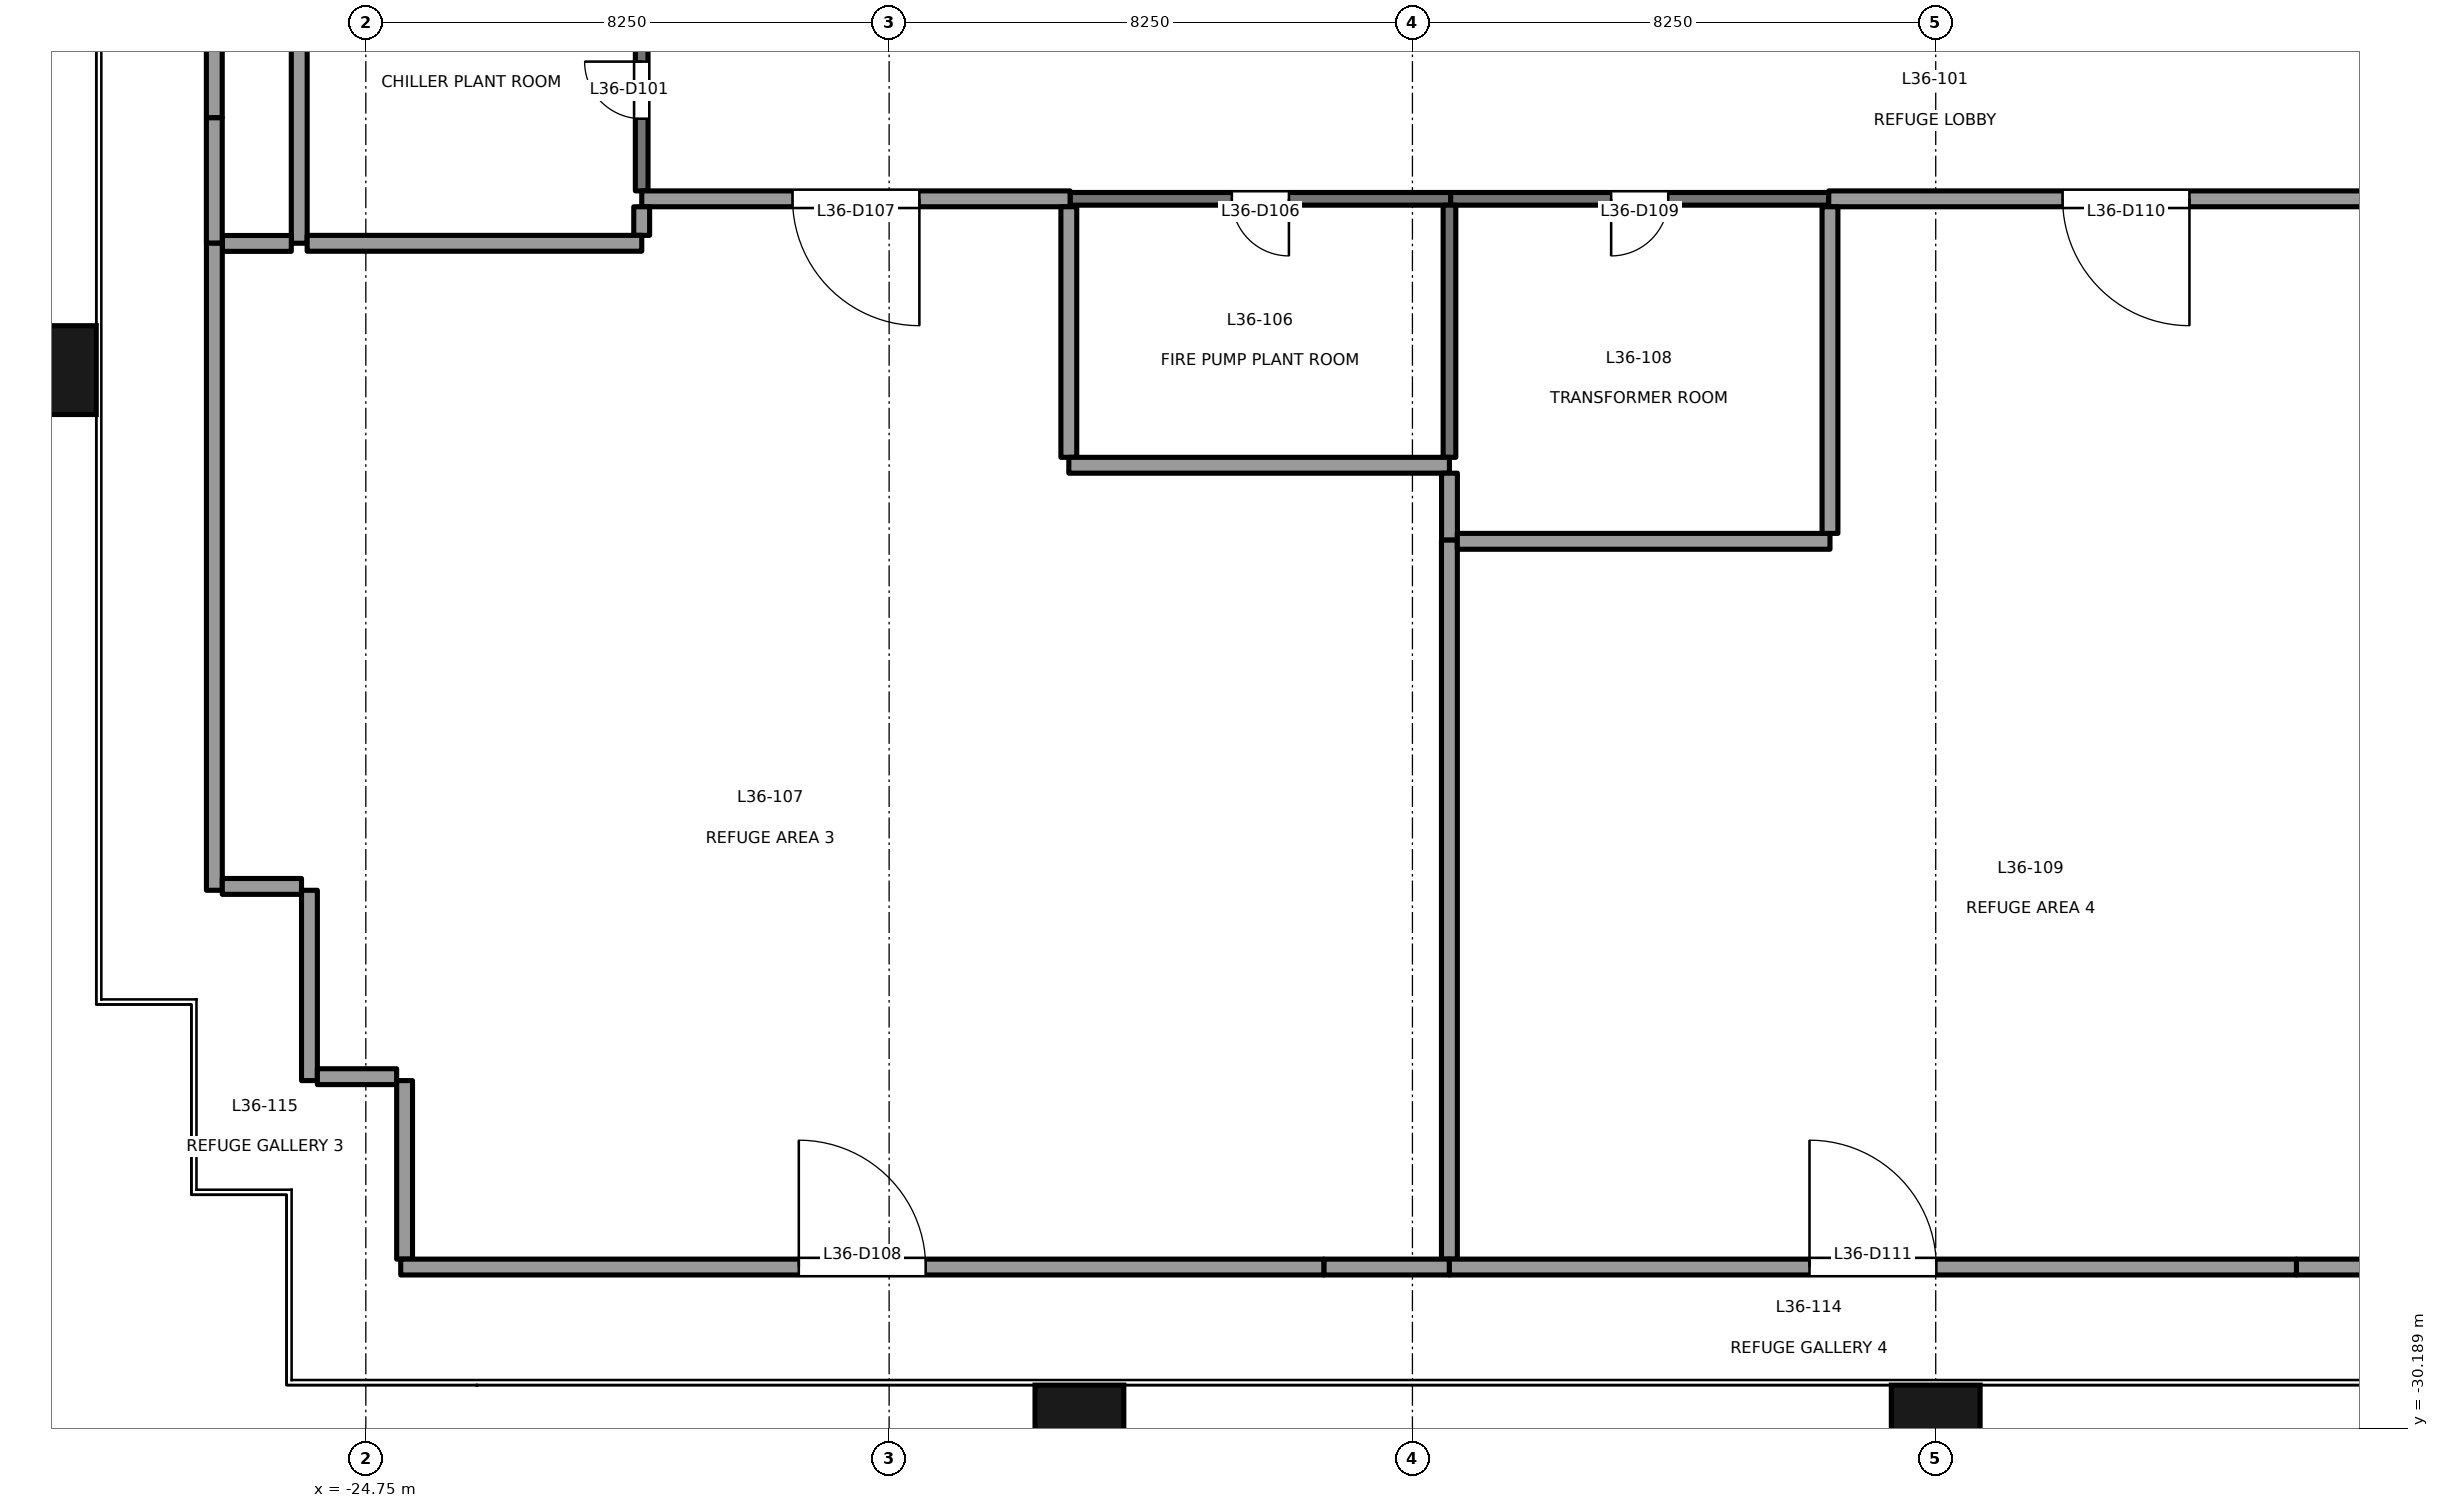
"""IFC4 building model, lengths in metres.
Left out: names, types, materials, properties, quantities, classifications, styles, units other than length and angle.
Written with IfcOpenShell. Run it as: python <this file> out.ifc"""

import sys

from ifc_helpers import new_model, si_unit, direction, frame, frame_2d, origin, origin_2d, place, context, subcontext, project, spatial, rectangle, extrude, element, fill, save


model = new_model("IFC4")
c1 = context("Model", 3, precision=1e-05, world=origin(), true_north=direction((0.0, 1.0)))
c2 = subcontext(c1, "Body", "Model", "MODEL_VIEW")
j1 = project(units=[si_unit("LENGTHUNIT", "METRE"), si_unit("PLANEANGLEUNIT", "RADIAN")], contexts=[c1])
p1 = place(None, origin())
s1 = spatial("IfcSite", under=j1, at=p1, CompositionType="ELEMENT")
p2 = place(p1, origin())
s2 = spatial("IfcBuilding", under=s1, at=p2, CompositionType="ELEMENT")
p3 = place(p2, frame((0.0, 0.0, 158.1)))
s3 = spatial("IfcBuildingStorey", under=s2, at=p3, CompositionType="ELEMENT", Elevation=158.1)
for number, where, z_axis, x_axis in (
    (1, (-13.5, -30.4, -0.2), (0.0, 0.0, 1.0), (1.0, 0.0, 0.0)),
    (2, (0.0, -30.4, -0.2), (0.0, 0.0, 1.0), (1.0, 0.0, 0.0)),
    (3, (-29.9, -13.5, -0.2), (0.0, 0.0, 1.0), (0.0, 1.0, 0.0)),
):
    element("IfcColumn", number, at=place(p3, frame(where, z_axis=z_axis, x_axis=x_axis)), inside=s3, PredefinedType="COLUMN", context=c2, shape_type="SweptSolid", body=[
        extrude(rectangle(XDim=1.4, YDim=1.8, at=origin_2d()), origin(), (0.0, 0.0, 1.0), 5.0),
    ])
p4 = place(p3, frame((-20.401, -10.675, 0.0), z_axis=(0.0, 0.0, 1.0), x_axis=(0.0, 1.0, 0.0)))
e4 = element("IfcWall", 4, at=p4, inside=s3, PredefinedType="PARTITIONING", context=c2, shape_type="SweptSolid", body=[
    extrude(rectangle(XDim=3.175, YDim=0.2, at=frame_2d((1.587, 0.0))), origin(), (0.0, 0.0, 1.0), 4.8),
])
p5 = place(p4, frame((1.138, 0.0, 0.0)))
e5 = element("IfcOpeningElement", 5, at=p5, cuts=e4, PredefinedType="OPENING", context=c2, shape_type="SweptSolid", body=[
    extrude(rectangle(XDim=0.9, YDim=2.1, at=frame_2d((0.45, 1.05))), frame((0.0, 0.111, 0.0), z_axis=(0.0, -1.0, 0.0), x_axis=(1.0, 0.0, 0.0)), (0.0, 0.0, 1.0), 0.221),
])
p6 = place(p3, frame((-7.647, -10.8, 0.0), z_axis=(0.0, 0.0, 1.0), x_axis=(-1.0, 0.0, 0.0)))
e6 = element("IfcWall", 6, at=p6, inside=s3, PredefinedType="PARTITIONING", context=c2, shape_type="SweptSolid", body=[
    extrude(rectangle(XDim=6.0, YDim=0.2, at=frame_2d((3.0, 0.0))), origin(), (0.0, 0.0, 1.0), 3.9),
])
p7 = place(p6, frame((2.55, 0.0, 0.0)))
e7 = element("IfcOpeningElement", 7, at=p7, cuts=e6, PredefinedType="OPENING", context=c2, shape_type="SweptSolid", body=[
    extrude(rectangle(XDim=0.9, YDim=2.1, at=frame_2d((0.45, 1.05))), frame((0.0, 0.111, 0.0), z_axis=(0.0, -1.0, 0.0), x_axis=(1.0, 0.0, 0.0)), (0.0, 0.0, 1.0), 0.221),
])
p8 = place(p3, frame((-13.647, -10.8, 0.0), z_axis=(0.0, 0.0, 1.0), x_axis=(-1.0, 0.0, 0.0)))
e8 = element("IfcWall", 8, at=p8, inside=s3, PredefinedType="PARTITIONING", context=c2, shape_type="SweptSolid", body=[
    extrude(rectangle(XDim=6.753, YDim=0.25, at=frame_2d((3.376, 0.0))), origin(), (0.0, 0.0, 1.0), 3.9),
])
p9 = place(p8, frame((2.376, 0.0, 0.0)))
e9 = element("IfcOpeningElement", 9, at=p9, cuts=e8, PredefinedType="OPENING", context=c2, shape_type="SweptSolid", body=[
    extrude(rectangle(XDim=2.0, YDim=2.1, at=frame_2d((1.0, 1.05))), frame((0.0, 0.135, 0.0), z_axis=(0.0, -1.0, 0.0), x_axis=(1.0, 0.0, 0.0)), (0.0, 0.0, 1.0), 0.271),
])
p10 = place(p3, frame((-1.687, -10.8, 0.0), z_axis=(0.0, 0.0, 1.0), x_axis=(-1.0, 0.0, 0.0)))
e10 = element("IfcWall", 10, at=p10, inside=s3, PredefinedType="PARTITIONING", context=c2, shape_type="SweptSolid", body=[
    extrude(rectangle(XDim=5.96, YDim=0.2, at=frame_2d((2.98, 0.0))), origin(), (0.0, 0.0, 1.0), 4.0),
])
p11 = place(p10, frame((2.53, 0.0, 0.0)))
e11 = element("IfcOpeningElement", 11, at=p11, cuts=e10, PredefinedType="OPENING", context=c2, shape_type="SweptSolid", body=[
    extrude(rectangle(XDim=0.9, YDim=2.1, at=frame_2d((0.45, 1.05))), frame((0.0, 0.111, 0.0), z_axis=(0.0, -1.0, 0.0), x_axis=(1.0, 0.0, 0.0)), (0.0, 0.0, 1.0), 0.221),
])
p12 = place(p3, frame((7.687, -10.8, 0.0), z_axis=(0.0, 0.0, 1.0), x_axis=(-1.0, 0.0, 0.0)))
e12 = element("IfcWall", 12, at=p12, inside=s3, PredefinedType="PARTITIONING", context=c2, shape_type="SweptSolid", body=[
    extrude(rectangle(XDim=9.374, YDim=0.25, at=frame_2d((4.687, 0.0))), origin(), (0.0, 0.0, 1.0), 2.55),
])
p13 = place(p12, frame((3.687, 0.0, 0.0)))
e13 = element("IfcOpeningElement", 13, at=p13, cuts=e12, PredefinedType="OPENING", context=c2, shape_type="SweptSolid", body=[
    extrude(rectangle(XDim=2.0, YDim=2.1, at=frame_2d((1.0, 1.05))), frame((0.0, 0.135, 0.0), z_axis=(0.0, -1.0, 0.0), x_axis=(1.0, 0.0, 0.0)), (0.0, 0.0, 1.0), 0.271),
])
p14 = place(p3, frame((-25.8, -11.5, 0.0), z_axis=(0.0, 0.0, 1.0), x_axis=(0.0, 1.0, 0.0)))
e14 = element("IfcWall", 14, at=p14, inside=s3, PredefinedType="PARTITIONING", context=c2, shape_type="SweptSolid", body=[
    extrude(rectangle(XDim=6.0, YDim=0.25, at=frame_2d((3.0, 0.0))), origin(), (0.0, 0.0, 1.0), 4.8),
])
p15 = place(p3, frame((-20.401, -10.925, 0.0), z_axis=(0.0, 0.0, 1.0), x_axis=(0.0, -1.0, 0.0)))
e15 = element("IfcWall", 15, at=p15, inside=s3, PredefinedType="PARTITIONING", context=c2, shape_type="SweptSolid", body=[
    extrude(rectangle(XDim=0.451, YDim=0.25, at=frame_2d((0.226, 0.0))), origin(), (0.0, 0.0, 1.0), 4.8),
])
p16 = place(p3, frame((-20.4, -11.501, 0.0), z_axis=(0.0, 0.0, 1.0), x_axis=(-1.0, 0.0, 0.0)))
e16 = element("IfcWall", 16, at=p16, inside=s3, PredefinedType="PARTITIONING", context=c2, shape_type="SweptSolid", body=[
    extrude(rectangle(XDim=5.275, YDim=0.25, at=frame_2d((2.638, 0.0))), origin(), (0.0, 0.0, 1.0), 4.8),
])
p17 = place(p3, frame((-25.925, -11.503, 0.0), z_axis=(0.0, 0.0, 1.0), x_axis=(-1.0, 0.0, 0.0)))
e17 = element("IfcWall", 17, at=p17, inside=s3, PredefinedType="PARTITIONING", context=c2, shape_type="SweptSolid", body=[
    extrude(rectangle(XDim=1.088, YDim=0.25, at=frame_2d((0.544, 0.0))), origin(), (0.0, 0.0, 1.0), 3.7),
])
p18 = place(p3, frame((-27.139, -11.5, 0.0), z_axis=(0.0, 0.0, 1.0), x_axis=(0.0, 1.0, 0.0)))
e18 = element("IfcWall", 18, at=p18, inside=s3, PredefinedType="PARTITIONING", context=c2, shape_type="SweptSolid", body=[
    extrude(rectangle(XDim=1.98, YDim=0.25, at=frame_2d((0.99, 0.0))), origin(), (0.0, 0.0, 1.0), 4.8),
])
p19 = place(p3, frame((-27.139, -2.5, 0.0), z_axis=(0.0, 0.0, 1.0), x_axis=(0.0, -1.0, 0.0)))
e19 = element("IfcWall", 19, at=p19, inside=s3, PredefinedType="PARTITIONING", context=c2, shape_type="SweptSolid", body=[
    extrude(rectangle(XDim=7.02, YDim=0.25, at=frame_2d((3.51, 0.0))), origin(), (0.0, 0.0, 1.0), 3.7),
])
p20 = place(p19, frame((2.51, 0.0, 0.0)))
e20 = element("IfcOpeningElement", 20, at=p20, cuts=e19, PredefinedType="OPENING", context=c2, shape_type="SweptSolid", body=[
    extrude(rectangle(XDim=2.0, YDim=2.1, at=frame_2d((1.0, 1.05))), frame((0.0, 0.135, 0.0), z_axis=(0.0, -1.0, 0.0), x_axis=(1.0, 0.0, 0.0)), (0.0, 0.0, 1.0), 0.271),
])
p21 = place(p3, frame((-13.667, -14.875, 0.0), z_axis=(0.0, 0.0, 1.0), x_axis=(0.0, 1.0, 0.0)))
e21 = element("IfcWall", 21, at=p21, inside=s3, PredefinedType="PARTITIONING", context=c2, shape_type="SweptSolid", body=[
    extrude(rectangle(XDim=3.95, YDim=0.25, at=frame_2d((1.975, 0.0))), origin(), (0.0, 0.0, 1.0), 3.9),
])
p22 = place(p3, frame((-7.667, -15.0, 0.0), z_axis=(0.0, 0.0, 1.0), x_axis=(-1.0, 0.0, 0.0)))
e22 = element("IfcWall", 22, at=p22, inside=s3, PredefinedType="PARTITIONING", context=c2, shape_type="SweptSolid", body=[
    extrude(rectangle(XDim=6.0, YDim=0.25, at=frame_2d((3.0, 0.0))), origin(), (0.0, 0.0, 1.0), 3.9),
])
p23 = place(p3, frame((-7.666, -10.9, 0.0), z_axis=(0.0, 0.0, 1.0), x_axis=(0.0, -1.0, 0.0)))
e23 = element("IfcWall", 23, at=p23, inside=s3, PredefinedType="PARTITIONING", context=c2, shape_type="SweptSolid", body=[
    extrude(rectangle(XDim=3.975, YDim=0.2, at=frame_2d((1.988, 0.0))), origin(), (0.0, 0.0, 1.0), 4.8),
])
p24 = place(p3, frame((-7.666, -15.125, 0.0), z_axis=(0.0, 0.0, 1.0), x_axis=(0.0, -1.0, 0.0)))
e24 = element("IfcWall", 24, at=p24, inside=s3, PredefinedType="PARTITIONING", context=c2, shape_type="SweptSolid", body=[
    extrude(rectangle(XDim=1.055, YDim=0.25, at=frame_2d((0.527, 0.0))), origin(), (0.0, 0.0, 1.0), 4.8),
])
p25 = place(p3, frame((-7.667, -16.18, 0.0), z_axis=(0.0, 0.0, 1.0), x_axis=(0.0, -1.0, 0.0)))
e25 = element("IfcWall", 25, at=p25, inside=s3, PredefinedType="PARTITIONING", context=c2, shape_type="SweptSolid", body=[
    extrude(rectangle(XDim=11.334, YDim=0.25, at=frame_2d((5.667, 0.0))), origin(), (0.0, 0.0, 1.0), 3.7),
])
p26 = place(p3, frame((-7.667, -27.639, 0.0), z_axis=(0.0, 0.0, 1.0), x_axis=(-1.0, 0.0, 0.0)))
e26 = element("IfcWall", 26, at=p26, inside=s3, PredefinedType="PARTITIONING", context=c2, shape_type="SweptSolid", body=[
    extrude(rectangle(XDim=1.98, YDim=0.25, at=frame_2d((0.99, 0.0))), origin(), (0.0, 0.0, 1.0), 4.8),
])
p27 = place(p3, frame((-27.138, -21.7, 0.0), z_axis=(0.0, 0.0, 1.0), x_axis=(0.0, 1.0, 0.0)))
e27 = element("IfcWall", 27, at=p27, inside=s3, PredefinedType="PARTITIONING", context=c2, shape_type="SweptSolid", body=[
    extrude(rectangle(XDim=10.2, YDim=0.25, at=frame_2d((5.1, 0.0))), origin(), (0.0, 0.0, 1.0), 2.75),
])
p28 = place(p3, frame((-25.764, -21.639, 0.0), z_axis=(0.0, 0.0, 1.0), x_axis=(-1.0, 0.0, 0.0)))
e28 = element("IfcWall", 28, at=p28, inside=s3, PredefinedType="PARTITIONING", context=c2, shape_type="SweptSolid", body=[
    extrude(rectangle(XDim=1.249, YDim=0.25, at=frame_2d((0.625, 0.0))), origin(), (0.0, 0.0, 1.0), 4.8),
])
p29 = place(p3, frame((-25.639, -24.7, 0.0), z_axis=(0.0, 0.0, 1.0), x_axis=(0.0, 1.0, 0.0)))
e29 = element("IfcWall", 29, at=p29, inside=s3, PredefinedType="PARTITIONING", context=c2, shape_type="SweptSolid", body=[
    extrude(rectangle(XDim=3.0, YDim=0.25, at=frame_2d((1.5, 0.0))), origin(), (0.0, 0.0, 1.0), 4.8),
])
p30 = place(p3, frame((-24.264, -24.638, 0.0), z_axis=(0.0, 0.0, 1.0), x_axis=(-1.0, 0.0, 0.0)))
e30 = element("IfcWall", 30, at=p30, inside=s3, PredefinedType="PARTITIONING", context=c2, shape_type="SweptSolid", body=[
    extrude(rectangle(XDim=1.25, YDim=0.25, at=frame_2d((0.625, 0.0))), origin(), (0.0, 0.0, 1.0), 4.8),
])
p31 = place(p3, frame((-24.139, -27.514, 0.0), z_axis=(0.0, 0.0, 1.0), x_axis=(0.0, 1.0, 0.0)))
e31 = element("IfcWall", 31, at=p31, inside=s3, PredefinedType="PARTITIONING", context=c2, shape_type="SweptSolid", body=[
    extrude(rectangle(XDim=2.814, YDim=0.25, at=frame_2d((1.407, 0.0))), origin(), (0.0, 0.0, 1.0), 4.8),
])
p32 = place(p3, frame((-24.2, -27.639, 0.0), z_axis=(0.0, 0.0, 1.0), x_axis=(1.0, 0.0, 0.0)))
e32 = element("IfcWall", 32, at=p32, inside=s3, PredefinedType="PARTITIONING", context=c2, shape_type="SweptSolid", body=[
    extrude(rectangle(XDim=14.553, YDim=0.25, at=frame_2d((7.276, 0.0))), origin(), (0.0, 0.0, 1.0), 2.75),
])
p33 = place(p32, frame((6.276, 0.0, 0.0)))
e33 = element("IfcOpeningElement", 33, at=p33, cuts=e32, PredefinedType="OPENING", context=c2, shape_type="SweptSolid", body=[
    extrude(rectangle(XDim=2.0, YDim=2.1, at=frame_2d((1.0, 1.05))), frame((0.0, 0.135, 0.0), z_axis=(0.0, -1.0, 0.0), x_axis=(1.0, 0.0, 0.0)), (0.0, 0.0, 1.0), 0.271),
])
p34 = place(p3, frame((-1.667, -16.199, 0.0), z_axis=(0.0, 0.0, 1.0), x_axis=(-1.0, 0.0, 0.0)))
e34 = element("IfcWall", 34, at=p34, inside=s3, PredefinedType="PARTITIONING", context=c2, shape_type="SweptSolid", body=[
    extrude(rectangle(XDim=5.875, YDim=0.25, at=frame_2d((2.938, 0.0))), origin(), (0.0, 0.0, 1.0), 4.0),
])
p35 = place(p3, frame((-1.667, -10.925, 0.0), z_axis=(0.0, 0.0, 1.0), x_axis=(0.0, -1.0, 0.0)))
e35 = element("IfcWall", 35, at=p35, inside=s3, PredefinedType="PARTITIONING", context=c2, shape_type="SweptSolid", body=[
    extrude(rectangle(XDim=5.149, YDim=0.25, at=frame_2d((2.574, 0.0))), origin(), (0.0, 0.0, 1.0), 4.8),
])
p36 = place(p3, frame((7.667, -27.639, 0.0), z_axis=(0.0, 0.0, 1.0), x_axis=(-1.0, 0.0, 0.0)))
e36 = element("IfcWall", 36, at=p36, inside=s3, PredefinedType="PARTITIONING", context=c2, shape_type="SweptSolid", body=[
    extrude(rectangle(XDim=1.98, YDim=0.25, at=frame_2d((0.99, 0.0))), origin(), (0.0, 0.0, 1.0), 4.8),
])
p37 = place(p3, frame((-7.667, -27.639, 0.0), z_axis=(0.0, 0.0, 1.0), x_axis=(1.0, 0.0, 0.0)))
e37 = element("IfcWall", 37, at=p37, inside=s3, PredefinedType="PARTITIONING", context=c2, shape_type="SweptSolid", body=[
    extrude(rectangle(XDim=13.354, YDim=0.25, at=frame_2d((6.677, 0.0))), origin(), (0.0, 0.0, 1.0), 2.55),
])
p38 = place(p37, frame((5.677, 0.0, 0.0)))
e38 = element("IfcOpeningElement", 38, at=p38, cuts=e37, PredefinedType="OPENING", context=c2, shape_type="SweptSolid", body=[
    extrude(rectangle(XDim=2.0, YDim=2.1, at=frame_2d((1.0, 1.05))), frame((0.0, 0.135, 0.0), z_axis=(0.0, -1.0, 0.0), x_axis=(1.0, 0.0, 0.0)), (0.0, 0.0, 1.0), 0.271),
])
p39 = place(p5, origin())
e39 = element("IfcDoor", 39, at=p39, inside=s3, OperationType="SINGLE_SWING_RIGHT", PredefinedType="DOOR", context=c2, shape_type="SweptSolid", body=[
    extrude(rectangle(XDim=0.9, YDim=2.1, at=frame_2d((0.45, 1.05))), frame((0.0, 0.025, 0.0), z_axis=(0.0, -1.0, 0.0), x_axis=(1.0, 0.0, 0.0)), (0.0, 0.0, 1.0), 0.05),
])
fill(e5, e39)
p40 = place(p7, origin())
e40 = element("IfcDoor", 40, at=p40, inside=s3, OperationType="SINGLE_SWING_LEFT", PredefinedType="DOOR", context=c2, shape_type="SweptSolid", body=[
    extrude(rectangle(XDim=0.9, YDim=2.1, at=frame_2d((0.45, 1.05))), frame((0.0, 0.025, 0.0), z_axis=(0.0, -1.0, 0.0), x_axis=(1.0, 0.0, 0.0)), (0.0, 0.0, 1.0), 0.05),
])
fill(e7, e40)
p41 = place(p9, origin())
e41 = element("IfcDoor", 41, at=p41, inside=s3, OperationType="DOUBLE_DOOR_SINGLE_SWING", PredefinedType="DOOR", context=c2, shape_type="SweptSolid", body=[
    extrude(rectangle(XDim=2.0, YDim=2.1, at=frame_2d((1.0, 1.05))), frame((0.0, 0.025, 0.0), z_axis=(0.0, -1.0, 0.0), x_axis=(1.0, 0.0, 0.0)), (0.0, 0.0, 1.0), 0.05),
])
fill(e9, e41)
p42 = place(p33, origin())
e42 = element("IfcDoor", 42, at=p42, inside=s3, OperationType="DOUBLE_DOOR_SINGLE_SWING", PredefinedType="DOOR", context=c2, shape_type="SweptSolid", body=[
    extrude(rectangle(XDim=2.0, YDim=2.1, at=frame_2d((1.0, 1.05))), frame((0.0, 0.025, 0.0), z_axis=(0.0, -1.0, 0.0), x_axis=(1.0, 0.0, 0.0)), (0.0, 0.0, 1.0), 0.05),
])
fill(e33, e42)
p43 = place(p11, origin())
e43 = element("IfcDoor", 43, at=p43, inside=s3, OperationType="SINGLE_SWING_RIGHT", PredefinedType="DOOR", context=c2, shape_type="SweptSolid", body=[
    extrude(rectangle(XDim=0.9, YDim=2.1, at=frame_2d((0.45, 1.05))), frame((0.0, 0.025, 0.0), z_axis=(0.0, -1.0, 0.0), x_axis=(1.0, 0.0, 0.0)), (0.0, 0.0, 1.0), 0.05),
])
fill(e11, e43)
p44 = place(p13, origin())
e44 = element("IfcDoor", 44, at=p44, inside=s3, OperationType="DOUBLE_DOOR_SINGLE_SWING", PredefinedType="DOOR", context=c2, shape_type="SweptSolid", body=[
    extrude(rectangle(XDim=2.0, YDim=2.1, at=frame_2d((1.0, 1.05))), frame((0.0, 0.025, 0.0), z_axis=(0.0, -1.0, 0.0), x_axis=(1.0, 0.0, 0.0)), (0.0, 0.0, 1.0), 0.05),
])
fill(e13, e44)
p45 = place(p38, origin())
e45 = element("IfcDoor", 45, at=p45, inside=s3, OperationType="DOUBLE_DOOR_SINGLE_SWING", PredefinedType="DOOR", context=c2, shape_type="SweptSolid", body=[
    extrude(rectangle(XDim=2.0, YDim=2.1, at=frame_2d((1.0, 1.05))), frame((0.0, 0.025, 0.0), z_axis=(0.0, -1.0, 0.0), x_axis=(1.0, 0.0, 0.0)), (0.0, 0.0, 1.0), 0.05),
])
fill(e38, e45)
save(model, sys.argv[1])
